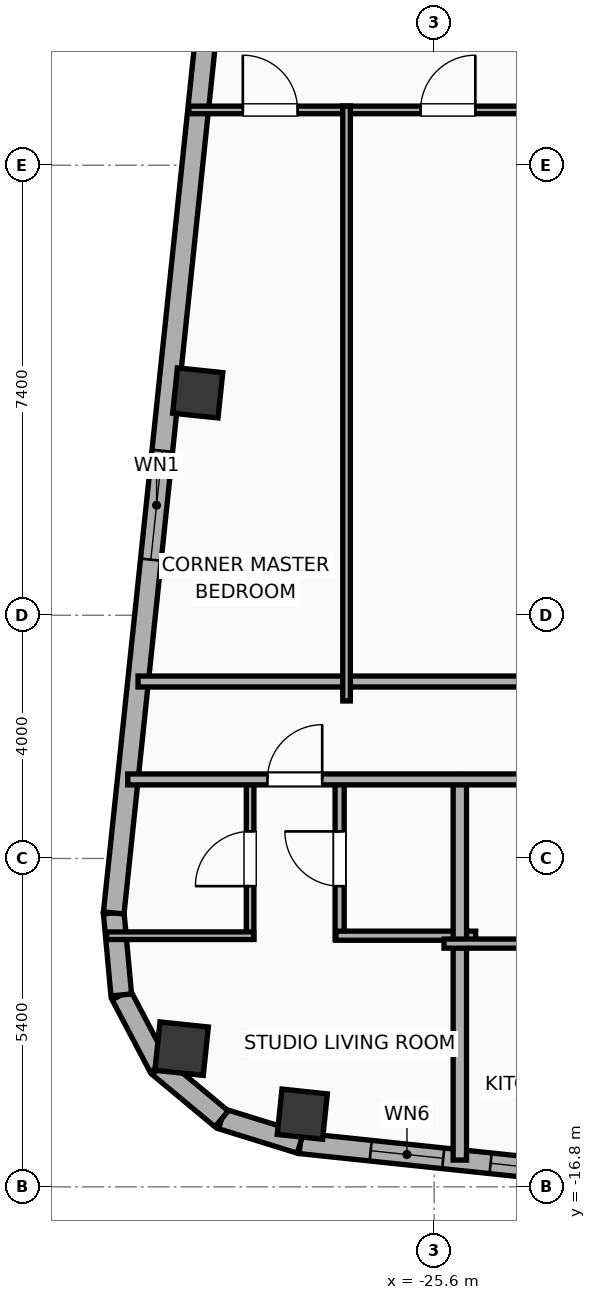
"""IFC4 building model, lengths in metres.
Left out: names, types, materials, properties, quantities, classifications, styles, units other than length and angle.
Written with IfcOpenShell. Run it as: python <this file> out.ifc"""

import sys

from ifc_helpers import new_model, si_unit, direction, frame, frame_2d, origin, origin_2d, place, context, subcontext, project, spatial, rectangle, hollow_rectangle, hollow_circle, extrude, element, fill, save


model = new_model("IFC4")
c1 = context("Model", 3, precision=1e-05, world=origin(), true_north=direction((0.0, 1.0)))
c2 = subcontext(c1, "Body", "Model", "MODEL_VIEW")
j1 = project(units=[si_unit("LENGTHUNIT", "METRE"), si_unit("PLANEANGLEUNIT", "RADIAN")], contexts=[c1])
p1 = place(None, origin())
s1 = spatial("IfcSite", under=j1, at=p1, CompositionType="ELEMENT")
p2 = place(p1, origin())
s2 = spatial("IfcBuilding", under=s1, at=p2, CompositionType="ELEMENT")
p3 = place(p2, frame((0.0, 0.0, 271.7)))
s3 = spatial("IfcBuildingStorey", under=s2, at=p3, CompositionType="ELEMENT", Elevation=271.7)
for number, where, z_axis, x_axis in (
    (1, (-27.769, -15.604, 0.0), (0.0, 0.0, 1.0), (0.995, -0.105, 0.0)),
    (2, (-29.489, -3.744, 0.0), (0.0, 0.0, 1.0), (0.995, -0.105, 0.0)),
):
    element("IfcColumn", number, at=place(p3, frame(where, z_axis=z_axis, x_axis=x_axis)), inside=s3, PredefinedType="COLUMN", context=c2, shape_type="SweptSolid", body=[
        extrude(hollow_rectangle(XDim=0.75, YDim=0.75, WallThickness=0.025, at=origin_2d()), origin(), (0.0, 0.0, 1.0), 3.9),
    ])
p4 = place(p3, frame((-29.753, -14.527, 0.0), z_axis=(0.0, 0.0, 1.0), x_axis=(0.994521895368, -0.104528463268, 0.0)))
e3 = element("IfcColumn", 3, at=p4, inside=s3, PredefinedType="COLUMN", context=c2, shape_type="SweptSolid", body=[
    extrude(hollow_circle(Radius=0.4, WallThickness=0.028, at=origin_2d()), origin(), (0.0, 0.0, 1.0), 3.9),
])
p5 = place(p3, frame((18.708, -20.972, 0.0), z_axis=(0.0, 0.0, 1.0), x_axis=(-0.994521888554, 0.104528528102, 0.0)))
e4 = element("IfcWall", 4, at=p5, inside=s3, PredefinedType="ELEMENTEDWALL", context=c2, shape_type="SweptSolid", body=[
    extrude(rectangle(XDim=46.766, YDim=0.34, at=frame_2d((23.383, 0.0))), origin(), (0.0, 0.0, 1.0), 3.65),
])
p6 = place(p5, frame((23.833, 0.0, 0.75)))
e5 = element("IfcOpeningElement", 5, at=p6, cuts=e4, PredefinedType="OPENING", context=c2, shape_type="SweptSolid", body=[
    extrude(rectangle(XDim=2.4, YDim=2.1, at=frame_2d((1.2, 1.05))), frame((0.0, 0.18, 0.0), z_axis=(0.0, -1.0, 0.0), x_axis=(1.0, 0.0, 0.0)), (0.0, 0.0, 1.0), 0.36),
])
p7 = place(p5, frame((38.622, 0.0, 0.75)))
e6 = element("IfcOpeningElement", 6, at=p7, cuts=e4, PredefinedType="OPENING", context=c2, shape_type="SweptSolid", body=[
    extrude(rectangle(XDim=2.4, YDim=2.1, at=frame_2d((1.2, 1.05))), frame((0.0, 0.18, 0.0), z_axis=(0.0, -1.0, 0.0), x_axis=(1.0, 0.0, 0.0)), (0.0, 0.0, 1.0), 0.36),
])
p8 = place(p5, frame((44.402, 0.0, 0.75)))
e7 = element("IfcOpeningElement", 7, at=p8, cuts=e4, PredefinedType="OPENING", context=c2, shape_type="SweptSolid", body=[
    extrude(rectangle(XDim=1.2, YDim=2.05, at=frame_2d((0.6, 1.025))), frame((0.0, 0.18, 0.0), z_axis=(0.0, -1.0, 0.0), x_axis=(1.0, 0.0, 0.0)), (0.0, 0.0, 1.0), 0.36),
])
p9 = place(p5, frame((42.419, 0.0, 0.75)))
e8 = element("IfcOpeningElement", 8, at=p9, cuts=e4, PredefinedType="OPENING", context=c2, shape_type="SweptSolid", body=[
    extrude(rectangle(XDim=1.2, YDim=2.05, at=frame_2d((0.6, 1.025))), frame((0.0, 0.18, 0.0), z_axis=(0.0, -1.0, 0.0), x_axis=(1.0, 0.0, 0.0)), (0.0, 0.0, 1.0), 0.36),
])
p10 = place(p5, frame((34.933, 0.0, 0.75)))
e9 = element("IfcOpeningElement", 9, at=p10, cuts=e4, PredefinedType="OPENING", context=c2, shape_type="SweptSolid", body=[
    extrude(rectangle(XDim=1.2, YDim=2.05, at=frame_2d((0.6, 1.025))), frame((0.0, 0.18, 0.0), z_axis=(0.0, -1.0, 0.0), x_axis=(1.0, 0.0, 0.0)), (0.0, 0.0, 1.0), 0.36),
])
p11 = place(p5, frame((28.692, 0.0, 0.75)))
e10 = element("IfcOpeningElement", 10, at=p11, cuts=e4, PredefinedType="OPENING", context=c2, shape_type="SweptSolid", body=[
    extrude(rectangle(XDim=1.2, YDim=2.05, at=frame_2d((0.6, 1.025))), frame((0.0, 0.18, 0.0), z_axis=(0.0, -1.0, 0.0), x_axis=(1.0, 0.0, 0.0)), (0.0, 0.0, 1.0), 0.36),
])
p12 = place(p5, frame((30.957, 0.0, 0.75)))
e11 = element("IfcOpeningElement", 11, at=p12, cuts=e4, PredefinedType="OPENING", context=c2, shape_type="SweptSolid", body=[
    extrude(rectangle(XDim=1.2, YDim=2.05, at=frame_2d((0.6, 1.025))), frame((0.0, 0.18, 0.0), z_axis=(0.0, -1.0, 0.0), x_axis=(1.0, 0.0, 0.0)), (0.0, 0.0, 1.0), 0.36),
])
p13 = place(p5, frame((7.492, 0.0, 0.75)))
e12 = element("IfcOpeningElement", 12, at=p13, cuts=e4, PredefinedType="OPENING", context=c2, shape_type="SweptSolid", body=[
    extrude(rectangle(XDim=1.2, YDim=2.05, at=frame_2d((0.6, 1.025))), frame((0.0, 0.18, 0.0), z_axis=(0.0, -1.0, 0.0), x_axis=(1.0, 0.0, 0.0)), (0.0, 0.0, 1.0), 0.36),
])
p14 = place(p5, frame((4.141, 0.0, 0.75)))
e13 = element("IfcOpeningElement", 13, at=p14, cuts=e4, PredefinedType="OPENING", context=c2, shape_type="SweptSolid", body=[
    extrude(rectangle(XDim=1.2, YDim=2.05, at=frame_2d((0.6, 1.025))), frame((0.0, 0.18, 0.0), z_axis=(0.0, -1.0, 0.0), x_axis=(1.0, 0.0, 0.0)), (0.0, 0.0, 1.0), 0.36),
])
p15 = place(p5, frame((1.36, 0.0, 0.75)))
e14 = element("IfcOpeningElement", 14, at=p15, cuts=e4, PredefinedType="OPENING", context=c2, shape_type="SweptSolid", body=[
    extrude(rectangle(XDim=1.2, YDim=2.05, at=frame_2d((0.6, 1.025))), frame((0.0, 0.18, 0.0), z_axis=(0.0, -1.0, 0.0), x_axis=(1.0, 0.0, 0.0)), (0.0, 0.0, 1.0), 0.36),
])
p16 = place(p5, frame((20.254, 0.0, 0.75)))
e15 = element("IfcOpeningElement", 15, at=p16, cuts=e4, PredefinedType="OPENING", context=c2, shape_type="SweptSolid", body=[
    extrude(rectangle(XDim=1.2, YDim=2.05, at=frame_2d((0.6, 1.025))), frame((0.0, 0.18, 0.0), z_axis=(0.0, -1.0, 0.0), x_axis=(1.0, 0.0, 0.0)), (0.0, 0.0, 1.0), 0.36),
])
p17 = place(p5, frame((16.172, 0.0, 0.75)))
e16 = element("IfcOpeningElement", 16, at=p17, cuts=e4, PredefinedType="OPENING", context=c2, shape_type="SweptSolid", body=[
    extrude(rectangle(XDim=1.2, YDim=2.05, at=frame_2d((0.6, 1.025))), frame((0.0, 0.18, 0.0), z_axis=(0.0, -1.0, 0.0), x_axis=(1.0, 0.0, 0.0)), (0.0, 0.0, 1.0), 0.36),
])
p18 = place(p5, frame((12.11, 0.0, 0.75)))
e17 = element("IfcOpeningElement", 17, at=p18, cuts=e4, PredefinedType="OPENING", context=c2, shape_type="SweptSolid", body=[
    extrude(rectangle(XDim=1.2, YDim=2.05, at=frame_2d((0.6, 1.025))), frame((0.0, 0.18, 0.0), z_axis=(0.0, -1.0, 0.0), x_axis=(1.0, 0.0, 0.0)), (0.0, 0.0, 1.0), 0.36),
])
p19 = place(p3, frame((-27.802, -16.084, 0.0), z_axis=(0.0, 0.0, 1.0), x_axis=(-0.955007802701, 0.296580674994, 0.0)))
e18 = element("IfcWall", 18, at=p19, inside=s3, PredefinedType="ELEMENTEDWALL", context=c2, shape_type="SweptSolid", body=[
    extrude(rectangle(XDim=1.354, YDim=0.34, at=frame_2d((0.677, 0.0))), origin(), (0.0, 0.0, 1.0), 3.65),
])
p20 = place(p3, frame((-29.096, -15.682, 0.0), z_axis=(0.0, 0.0, 1.0), x_axis=(-0.768864427906, 0.639411832469, 0.0)))
e19 = element("IfcWall", 19, at=p20, inside=s3, PredefinedType="ELEMENTEDWALL", context=c2, shape_type="SweptSolid", body=[
    extrude(rectangle(XDim=1.337, YDim=0.34, at=frame_2d((0.668, 0.0))), origin(), (0.0, 0.0, 1.0), 3.65),
])
p21 = place(p3, frame((-30.124, -14.827, 0.0), z_axis=(0.0, 0.0, 1.0), x_axis=(-0.465528132217, 0.885033083062, 0.0)))
e20 = element("IfcWall", 20, at=p21, inside=s3, PredefinedType="ELEMENTEDWALL", context=c2, shape_type="SweptSolid", body=[
    extrude(rectangle(XDim=1.337, YDim=0.34, at=frame_2d((0.668, 0.0))), origin(), (0.0, 0.0, 1.0), 3.65),
])
p22 = place(p3, frame((-30.746, -13.644, 0.0), z_axis=(0.0, 0.0, 1.0), x_axis=(-0.091592370975, 0.995796584438, 0.0)))
e21 = element("IfcWall", 21, at=p22, inside=s3, PredefinedType="ELEMENTEDWALL", context=c2, shape_type="SweptSolid", body=[
    extrude(rectangle(XDim=1.354, YDim=0.34, at=frame_2d((0.677, 0.0))), origin(), (0.0, 0.0, 1.0), 3.65),
])
p23 = place(p3, frame((-30.87, -12.296, 0.0), z_axis=(0.0, 0.0, 1.0), x_axis=(0.104533282919, 0.994521388791, 0.0)))
e22 = element("IfcWall", 22, at=p23, inside=s3, PredefinedType="ELEMENTEDWALL", context=c2, shape_type="SweptSolid", body=[
    extrude(rectangle(XDim=30.366, YDim=0.34, at=frame_2d((15.183, 0.0))), origin(), (0.0, 0.0, 1.0), 3.65),
])
p24 = place(p23, frame((5.842, 0.0, 0.75)))
e23 = element("IfcOpeningElement", 23, at=p24, cuts=e22, PredefinedType="OPENING", context=c2, shape_type="SweptSolid", body=[
    extrude(rectangle(XDim=1.8, YDim=2.1, at=frame_2d((0.9, 1.05))), frame((0.0, 0.18, 0.0), z_axis=(0.0, -1.0, 0.0), x_axis=(1.0, 0.0, 0.0)), (0.0, 0.0, 1.0), 0.36),
])
p25 = place(p23, frame((23.525, 0.0, 0.75)))
e24 = element("IfcOpeningElement", 24, at=p25, cuts=e22, PredefinedType="OPENING", context=c2, shape_type="SweptSolid", body=[
    extrude(rectangle(XDim=1.8, YDim=2.1, at=frame_2d((0.9, 1.05))), frame((0.0, 0.18, 0.0), z_axis=(0.0, -1.0, 0.0), x_axis=(1.0, 0.0, 0.0)), (0.0, 0.0, 1.0), 0.36),
])
p26 = place(p23, frame((27.017, 0.0, 0.75)))
e25 = element("IfcOpeningElement", 25, at=p26, cuts=e22, PredefinedType="OPENING", context=c2, shape_type="SweptSolid", body=[
    extrude(rectangle(XDim=1.2, YDim=2.05, at=frame_2d((0.6, 1.025))), frame((0.0, 0.18, 0.0), z_axis=(0.0, -1.0, 0.0), x_axis=(1.0, 0.0, 0.0)), (0.0, 0.0, 1.0), 0.36),
])
p27 = place(p23, frame((16.135, 0.0, 0.75)))
e26 = element("IfcOpeningElement", 26, at=p27, cuts=e22, PredefinedType="OPENING", context=c2, shape_type="SweptSolid", body=[
    extrude(rectangle(XDim=1.2, YDim=2.05, at=frame_2d((0.6, 1.025))), frame((0.0, 0.18, 0.0), z_axis=(0.0, -1.0, 0.0), x_axis=(1.0, 0.0, 0.0)), (0.0, 0.0, 1.0), 0.36),
])
p28 = place(p3, frame((-30.47, -8.49, 0.0), z_axis=(0.0, 0.0, 1.0), x_axis=(1.0, 0.0, 0.0)))
e27 = element("IfcWall", 27, at=p28, inside=s3, PredefinedType="PARTITIONING", context=c2, shape_type="SweptSolid", body=[
    extrude(rectangle(XDim=20.59, YDim=0.18, at=frame_2d((10.295, 0.0))), origin(), (0.0, 0.0, 1.0), 3.65),
])
p29 = place(p3, frame((-28.627, -12.73, 0.0), z_axis=(0.0, 0.0, 1.0), x_axis=(0.0, 1.0, 0.0)))
e28 = element("IfcWall", 28, at=p29, inside=s3, PredefinedType="PARTITIONING", context=c2, shape_type="SweptSolid", body=[
    extrude(rectangle(XDim=2.65, YDim=0.125, at=frame_2d((1.325, 0.0))), origin(), (0.0, 0.0, 1.0), 3.65),
])
p30 = place(p29, frame((0.875, 0.0, 0.0)))
e29 = element("IfcOpeningElement", 29, at=p30, cuts=e28, PredefinedType="OPENING", context=c2, shape_type="SweptSolid", body=[
    extrude(rectangle(XDim=0.9, YDim=2.05, at=frame_2d((0.45, 1.025))), frame((0.0, 0.073, 0.0), z_axis=(0.0, -1.0, 0.0), x_axis=(1.0, 0.0, 0.0)), (0.0, 0.0, 1.0), 0.145),
])
p31 = place(p3, frame((-27.155, -12.73, 0.0), z_axis=(0.0, 0.0, 1.0), x_axis=(0.0, 1.0, 0.0)))
e30 = element("IfcWall", 30, at=p31, inside=s3, PredefinedType="PLUMBINGWALL", context=c2, shape_type="SweptSolid", body=[
    extrude(rectangle(XDim=2.65, YDim=0.15, at=frame_2d((1.325, 0.0))), origin(), (0.0, 0.0, 1.0), 3.65),
])
p32 = place(p31, frame((0.875, 0.0, 0.0)))
e31 = element("IfcOpeningElement", 31, at=p32, cuts=e30, PredefinedType="OPENING", context=c2, shape_type="SweptSolid", body=[
    extrude(rectangle(XDim=0.9, YDim=2.05, at=frame_2d((0.45, 1.025))), frame((0.0, 0.085, 0.0), z_axis=(0.0, -1.0, 0.0), x_axis=(1.0, 0.0, 0.0)), (0.0, 0.0, 1.0), 0.17),
])
p33 = place(p3, frame((-30.986, -12.67, 0.0), z_axis=(0.0, 0.0, 1.0), x_axis=(1.0, 0.0, 0.0)))
e32 = element("IfcWall", 32, at=p33, inside=s3, PredefinedType="PARTITIONING", context=c2, shape_type="SweptSolid", body=[
    extrude(rectangle(XDim=2.419, YDim=0.125, at=frame_2d((1.21, 0.0))), origin(), (0.0, 0.0, 1.0), 3.65),
])
p34 = place(p3, frame((-27.215, -12.67, 0.0), z_axis=(0.0, 0.0, 1.0), x_axis=(1.0, 0.0, 0.0)))
e33 = element("IfcWall", 33, at=p34, inside=s3, PredefinedType="PLUMBINGWALL", context=c2, shape_type="SweptSolid", body=[
    extrude(rectangle(XDim=2.297, YDim=0.15, at=frame_2d((1.148, 0.0))), origin(), (0.0, 0.0, 1.0), 3.65),
])
p35 = place(p3, frame((-25.178, -16.36, 0.0), z_axis=(0.0, 0.0, 1.0), x_axis=(0.0, 1.0, 0.0)))
e34 = element("IfcWall", 34, at=p35, inside=s3, PredefinedType="PARTITIONING", context=c2, shape_type="SweptSolid", body=[
    extrude(rectangle(XDim=6.34, YDim=0.22, at=frame_2d((3.17, 0.0))), origin(), (0.0, 0.0, 1.0), 3.65),
])
p36 = place(p3, frame((-25.438, -12.8, 0.0), z_axis=(0.0, 0.0, 1.0), x_axis=(1.0, 0.0, 0.0)))
e35 = element("IfcWall", 35, at=p36, inside=s3, PredefinedType="PLUMBINGWALL", context=c2, shape_type="SweptSolid", body=[
    extrude(rectangle(XDim=2.55, YDim=0.15, at=frame_2d((1.275, 0.0))), origin(), (0.0, 0.0, 1.0), 3.65),
])
p37 = place(p3, frame((-30.639, -10.1, 0.0), z_axis=(0.0, 0.0, 1.0), x_axis=(1.0, 0.0, 0.0)))
e36 = element("IfcWall", 36, at=p37, inside=s3, PredefinedType="PARTITIONING", context=c2, shape_type="SweptSolid", body=[
    extrude(rectangle(XDim=22.559, YDim=0.18, at=frame_2d((11.28, 0.0))), origin(), (0.0, 0.0, 1.0), 3.65),
])
p38 = place(p37, frame((2.298, 0.0, 0.0)))
e37 = element("IfcOpeningElement", 37, at=p38, cuts=e36, PredefinedType="OPENING", context=c2, shape_type="SweptSolid", body=[
    extrude(rectangle(XDim=0.9, YDim=2.05, at=frame_2d((0.45, 1.025))), frame((0.0, 0.1, 0.0), z_axis=(0.0, -1.0, 0.0), x_axis=(1.0, 0.0, 0.0)), (0.0, 0.0, 1.0), 0.2),
])
p39 = place(p37, frame((8.812, 0.0, 0.0)))
e38 = element("IfcOpeningElement", 38, at=p39, cuts=e36, PredefinedType="OPENING", context=c2, shape_type="SweptSolid", body=[
    extrude(rectangle(XDim=1.15, YDim=2.05, at=frame_2d((0.575, 1.025))), frame((0.0, 0.1, 0.0), z_axis=(0.0, -1.0, 0.0), x_axis=(1.0, 0.0, 0.0)), (0.0, 0.0, 1.0), 0.2),
])
p40 = place(p37, frame((13.738, 0.0, 0.0)))
e39 = element("IfcOpeningElement", 39, at=p40, cuts=e36, PredefinedType="OPENING", context=c2, shape_type="SweptSolid", body=[
    extrude(rectangle(XDim=0.9, YDim=2.05, at=frame_2d((0.45, 1.025))), frame((0.0, 0.1, 0.0), z_axis=(0.0, -1.0, 0.0), x_axis=(1.0, 0.0, 0.0)), (0.0, 0.0, 1.0), 0.2),
])
p41 = place(p37, frame((20.209, 0.0, 0.0)))
e40 = element("IfcOpeningElement", 40, at=p41, cuts=e36, PredefinedType="OPENING", context=c2, shape_type="SweptSolid", body=[
    extrude(rectangle(XDim=1.15, YDim=2.05, at=frame_2d((0.575, 1.025))), frame((0.0, 0.1, 0.0), z_axis=(0.0, -1.0, 0.0), x_axis=(1.0, 0.0, 0.0)), (0.0, 0.0, 1.0), 0.2),
])
p42 = place(p3, frame((-29.633, 0.91, 0.0), z_axis=(0.0, 0.0, 1.0), x_axis=(1.0, 0.0, 0.0)))
e41 = element("IfcWall", 41, at=p42, inside=s3, PredefinedType="PARTITIONING", context=c2, shape_type="SweptSolid", body=[
    extrude(rectangle(XDim=2.655, YDim=0.125, at=frame_2d((1.327, 0.0))), origin(), (0.0, 0.0, 1.0), 3.65),
])
p43 = place(p42, frame((0.886, 0.0, 0.0)))
e42 = element("IfcOpeningElement", 42, at=p43, cuts=e41, PredefinedType="OPENING", context=c2, shape_type="SweptSolid", body=[
    extrude(rectangle(XDim=0.9, YDim=2.05, at=frame_2d((0.45, 1.025))), frame((0.0, 0.073, 0.0), z_axis=(0.0, -1.0, 0.0), x_axis=(1.0, 0.0, 0.0)), (0.0, 0.0, 1.0), 0.145),
])
p44 = place(p3, frame((-27.104, 0.91, 0.0), z_axis=(0.0, 0.0, 1.0), x_axis=(1.0, 0.0, 0.0)))
e43 = element("IfcWall", 43, at=p44, inside=s3, PredefinedType="PARTITIONING", context=c2, shape_type="SweptSolid", body=[
    extrude(rectangle(XDim=3.461, YDim=0.125, at=frame_2d((1.73, 0.0))), origin(), (0.0, 0.0, 1.0), 3.65),
])
p45 = place(p44, frame((1.281, 0.0, 0.0)))
e44 = element("IfcOpeningElement", 44, at=p45, cuts=e43, PredefinedType="OPENING", context=c2, shape_type="SweptSolid", body=[
    extrude(rectangle(XDim=0.9, YDim=2.05, at=frame_2d((0.45, 1.025))), frame((0.0, 0.073, 0.0), z_axis=(0.0, -1.0, 0.0), x_axis=(1.0, 0.0, 0.0)), (0.0, 0.0, 1.0), 0.145),
])
p46 = place(p3, frame((-27.041, -8.81, 0.0), z_axis=(0.0, 0.0, 1.0), x_axis=(0.0, 1.0, 0.0)))
e45 = element("IfcWall", 45, at=p46, inside=s3, PredefinedType="PARTITIONING", context=c2, shape_type="SweptSolid", body=[
    extrude(rectangle(XDim=9.78, YDim=0.125, at=frame_2d((4.89, 0.0))), origin(), (0.0, 0.0, 1.0), 3.65),
])
p47 = place(p24, origin())
e46 = element("IfcWindow", 46, at=p47, inside=s3, PartitioningType="SINGLE_PANEL", PredefinedType="WINDOW", context=c2, shape_type="SweptSolid", body=[
    extrude(rectangle(XDim=1.8, YDim=2.1, at=frame_2d((0.9, 1.05))), frame((0.0, 0.03, 0.0), z_axis=(0.0, -1.0, 0.0), x_axis=(1.0, 0.0, 0.0)), (0.0, 0.0, 1.0), 0.06),
])
fill(e23, e46)
p48 = place(p8, origin())
e47 = element("IfcWindow", 47, at=p48, inside=s3, PartitioningType="SINGLE_PANEL", PredefinedType="WINDOW", context=c2, shape_type="SweptSolid", body=[
    extrude(rectangle(XDim=1.2, YDim=2.05, at=frame_2d((0.6, 1.025))), frame((0.0, 0.03, 0.0), z_axis=(0.0, -1.0, 0.0), x_axis=(1.0, 0.0, 0.0)), (0.0, 0.0, 1.0), 0.06),
])
fill(e7, e47)
p49 = place(p9, origin())
e48 = element("IfcWindow", 48, at=p49, inside=s3, PartitioningType="SINGLE_PANEL", PredefinedType="WINDOW", context=c2, shape_type="SweptSolid", body=[
    extrude(rectangle(XDim=1.2, YDim=2.05, at=frame_2d((0.6, 1.025))), frame((0.0, 0.03, 0.0), z_axis=(0.0, -1.0, 0.0), x_axis=(1.0, 0.0, 0.0)), (0.0, 0.0, 1.0), 0.06),
])
fill(e8, e48)
p50 = place(p30, origin())
e49 = element("IfcDoor", 49, at=p50, inside=s3, OperationType="SINGLE_SWING_LEFT", PredefinedType="DOOR", context=c2, shape_type="SweptSolid", body=[
    extrude(rectangle(XDim=0.9, YDim=2.05, at=frame_2d((0.45, 1.025))), frame((0.0, 0.025, 0.0), z_axis=(0.0, -1.0, 0.0), x_axis=(1.0, 0.0, 0.0)), (0.0, 0.0, 1.0), 0.05),
])
fill(e29, e49)
p51 = place(p32, origin())
e50 = element("IfcDoor", 50, at=p51, inside=s3, OperationType="SINGLE_SWING_RIGHT", PredefinedType="DOOR", context=c2, shape_type="SweptSolid", body=[
    extrude(rectangle(XDim=0.9, YDim=2.05, at=frame_2d((0.45, 1.025))), frame((0.0, 0.025, 0.0), z_axis=(0.0, -1.0, 0.0), x_axis=(1.0, 0.0, 0.0)), (0.0, 0.0, 1.0), 0.05),
])
fill(e31, e50)
p52 = place(p38, origin())
e51 = element("IfcDoor", 51, at=p52, inside=s3, OperationType="SINGLE_SWING_RIGHT", PredefinedType="DOOR", context=c2, shape_type="SweptSolid", body=[
    extrude(rectangle(XDim=0.9, YDim=2.05, at=frame_2d((0.45, 1.025))), frame((0.0, 0.025, 0.0), z_axis=(0.0, -1.0, 0.0), x_axis=(1.0, 0.0, 0.0)), (0.0, 0.0, 1.0), 0.05),
])
fill(e37, e51)
p53 = place(p43, origin())
e52 = element("IfcDoor", 52, at=p53, inside=s3, OperationType="SINGLE_SWING_LEFT", PredefinedType="DOOR", context=c2, shape_type="SweptSolid", body=[
    extrude(rectangle(XDim=0.9, YDim=2.05, at=frame_2d((0.45, 1.025))), frame((0.0, 0.025, 0.0), z_axis=(0.0, -1.0, 0.0), x_axis=(1.0, 0.0, 0.0)), (0.0, 0.0, 1.0), 0.05),
])
fill(e42, e52)
p54 = place(p45, origin())
e53 = element("IfcDoor", 53, at=p54, inside=s3, OperationType="SINGLE_SWING_RIGHT", PredefinedType="DOOR", context=c2, shape_type="SweptSolid", body=[
    extrude(rectangle(XDim=0.9, YDim=2.05, at=frame_2d((0.45, 1.025))), frame((0.0, 0.025, 0.0), z_axis=(0.0, -1.0, 0.0), x_axis=(1.0, 0.0, 0.0)), (0.0, 0.0, 1.0), 0.05),
])
fill(e44, e53)
save(model, sys.argv[1])
